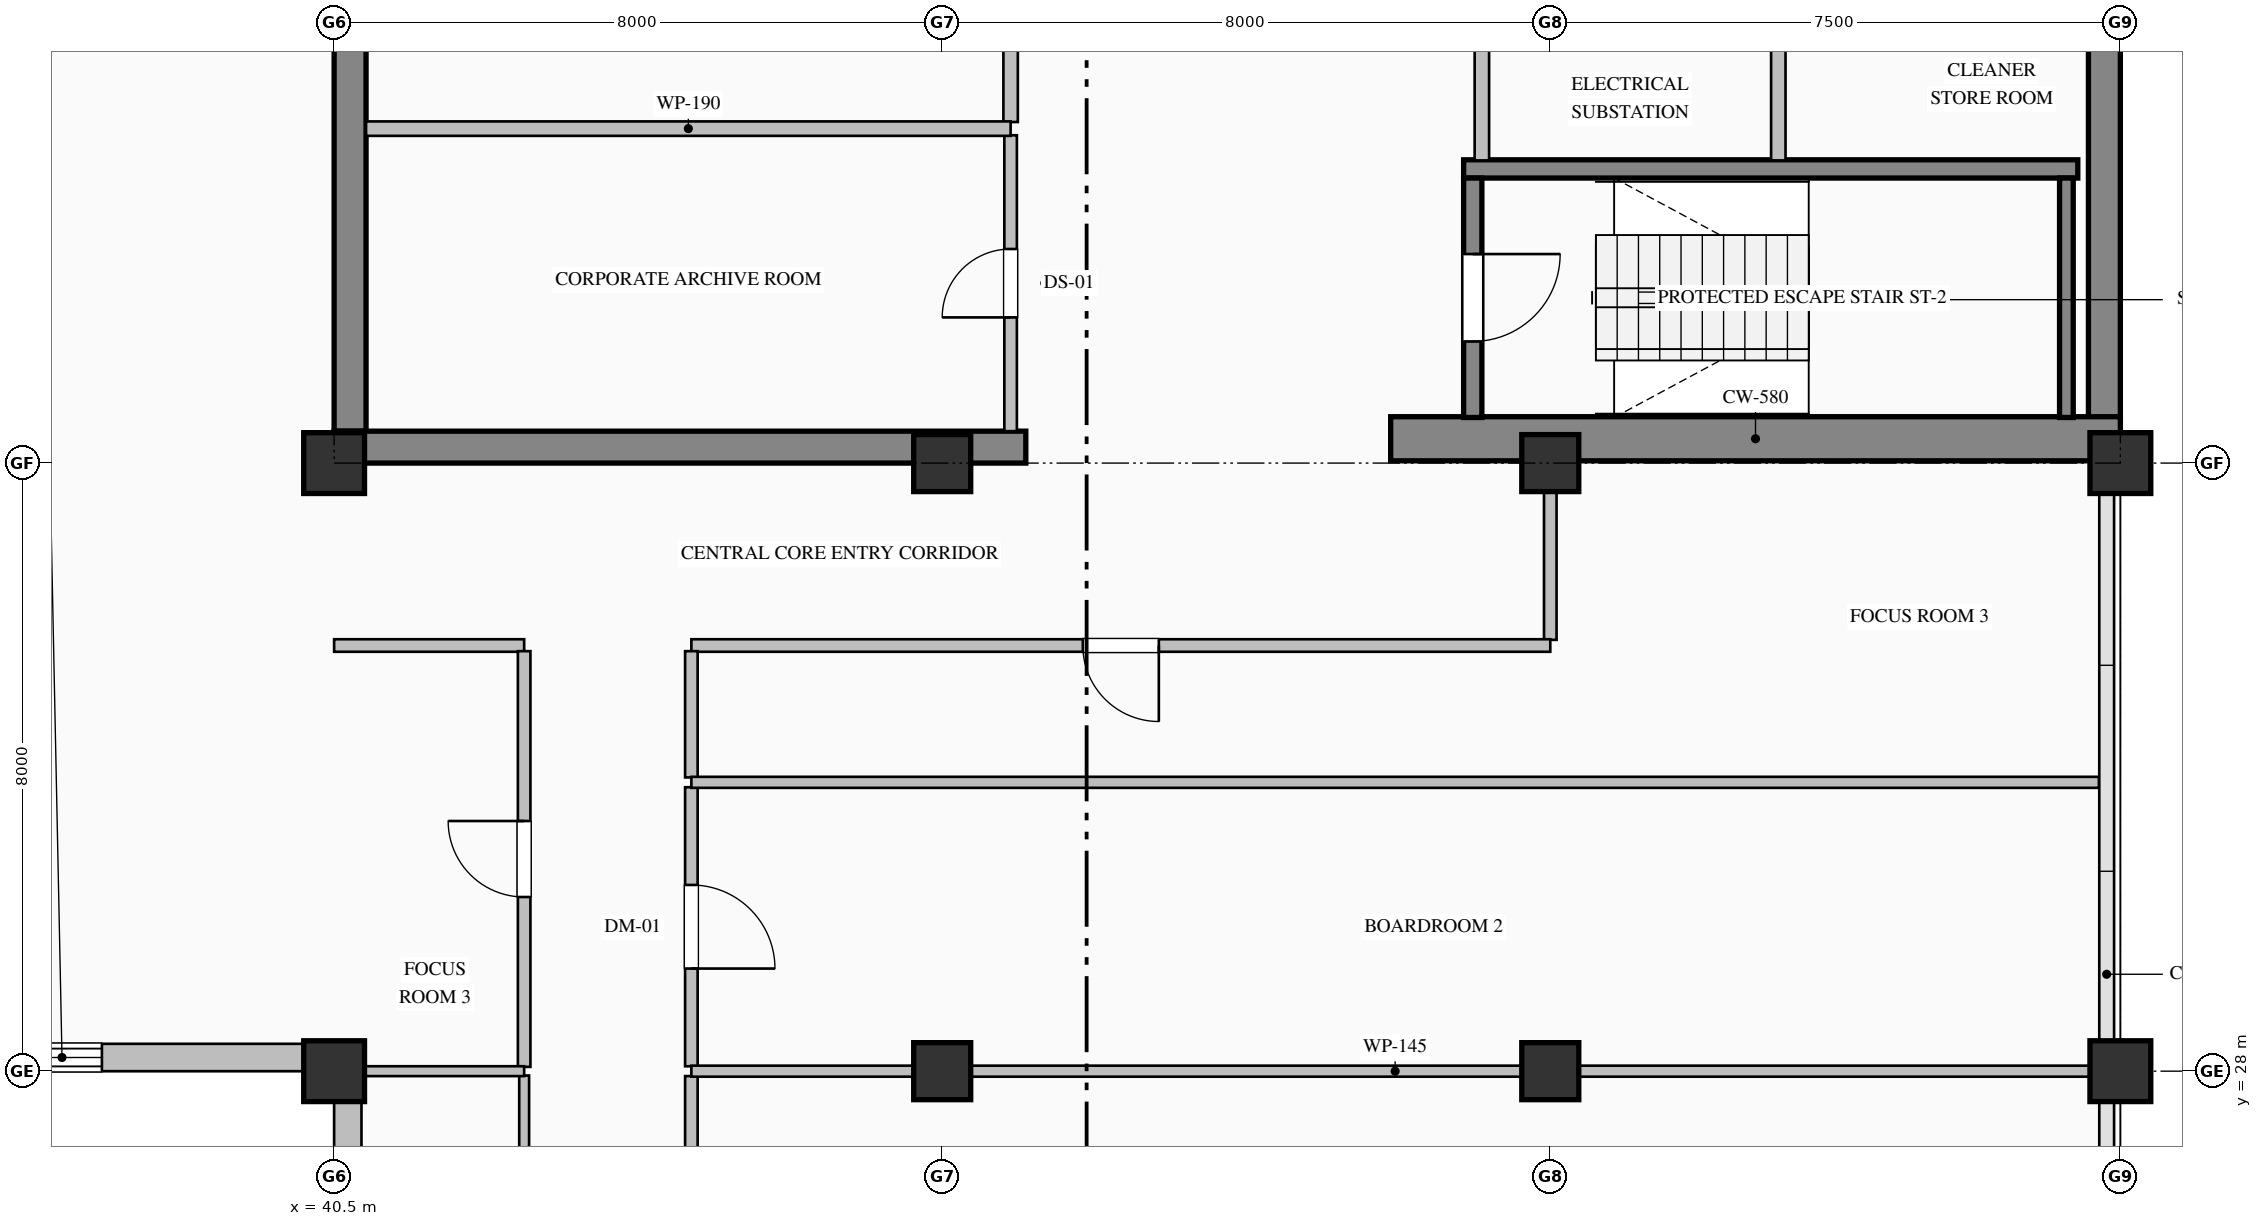
"""IFC4 building model, lengths in metres.
Left out: names, types, materials, properties, quantities, classifications, styles, units other than length and angle.
Written with IfcOpenShell. Run it as: python <this file> out.ifc"""

import sys

from ifc_helpers import new_model, si_unit, direction, frame, frame_2d, origin, origin_2d, place, context, subcontext, project, spatial, rectangle, hollow_rectangle, extrude, element, fill, save


model = new_model("IFC4")
c1 = context("Model", 3, precision=1e-05, world=origin(), true_north=direction((0.0, 1.0)))
c2 = subcontext(c1, "Body", "Model", "MODEL_VIEW")
j1 = project(units=[si_unit("LENGTHUNIT", "METRE"), si_unit("PLANEANGLEUNIT", "RADIAN")], contexts=[c1])
p1 = place(None, origin())
s1 = spatial("IfcSite", under=j1, at=p1, CompositionType="ELEMENT")
p2 = place(p1, origin())
s2 = spatial("IfcBuilding", under=s1, at=p2, CompositionType="ELEMENT")
p3 = place(p2, frame((0.0, 0.0, 299.2)))
s3 = spatial("IfcBuildingStorey", under=s2, at=p3, CompositionType="ELEMENT", Elevation=299.2)
p4 = place(p3, frame((63.79, 36.32, 0.0), z_axis=(0.0, 0.0, 1.0), x_axis=(0.0, 1.0, 0.0)))
e1 = element("IfcWall", 1, at=p4, inside=s3, PredefinedType="SHEAR", context=c2, shape_type="SweptSolid", body=[
    extrude(rectangle(XDim=15.26, YDim=0.42, at=frame_2d((7.63, 0.0))), origin(), (0.0, 0.0, 1.0), 3.785),
])
p5 = place(p3, frame((40.71, 36.42, 0.0), z_axis=(0.0, 0.0, 1.0), x_axis=(0.0, 1.0, 0.0)))
e2 = element("IfcWall", 2, at=p5, inside=s3, PredefinedType="SHEAR", context=c2, shape_type="SweptSolid", body=[
    extrude(rectangle(XDim=7.98, YDim=0.42, at=frame_2d((3.99, 0.0))), origin(), (0.0, 0.0, 1.0), 3.785),
])
p6 = place(p3, frame((40.5, 36.21, 0.0), z_axis=(0.0, 0.0, 1.0), x_axis=(1.0, 0.0, 0.0)))
e3 = element("IfcWall", 3, at=p6, inside=s3, PredefinedType="SHEAR", context=c2, shape_type="SweptSolid", body=[
    extrude(rectangle(XDim=9.1, YDim=0.42, at=frame_2d((4.55, 0.0))), origin(), (0.0, 0.0, 1.0), 3.785),
])
p7 = place(p3, frame((54.4, 36.32, 0.0), z_axis=(0.0, 0.0, 1.0), x_axis=(1.0, 0.0, 0.0)))
e4 = element("IfcWall", 4, at=p7, inside=s3, PredefinedType="SHEAR", context=c2, shape_type="SweptSolid", body=[
    extrude(rectangle(XDim=9.6, YDim=0.58, at=frame_2d((4.8, 0.0))), origin(), (0.0, 0.0, 1.0), 4.0),
])
for number, where, z_axis, x_axis in (
    (5, (40.5, 28.0, 0.0), (0.0, 0.0, 1.0), (1.0, 0.0, 0.0)),
    (6, (40.5, 36.0, 0.0), (0.0, 0.0, 1.0), (1.0, 0.0, 0.0)),
):
    element("IfcColumn", number, at=place(p3, frame(where, z_axis=z_axis, x_axis=x_axis)), inside=s3, PredefinedType="COLUMN", context=c2, shape_type="SweptSolid", body=[
        extrude(hollow_rectangle(XDim=0.8, YDim=0.8, WallThickness=0.032, at=origin_2d()), origin(), (0.0, 0.0, 1.0), 4.0),
    ])
for number, where, z_axis, x_axis in (
    (7, (48.5, 28.0, 0.0), (0.0, 0.0, 1.0), (1.0, 0.0, 0.0)),
    (8, (48.5, 36.0, 0.0), (0.0, 0.0, 1.0), (1.0, 0.0, 0.0)),
    (9, (56.5, 28.0, 0.0), (0.0, 0.0, 1.0), (1.0, 0.0, 0.0)),
    (10, (56.5, 36.0, 0.0), (0.0, 0.0, 1.0), (1.0, 0.0, 0.0)),
):
    element("IfcColumn", number, at=place(p3, frame(where, z_axis=z_axis, x_axis=x_axis)), inside=s3, PredefinedType="COLUMN", context=c2, shape_type="SweptSolid", body=[
        extrude(rectangle(XDim=0.75, YDim=0.75, at=origin_2d()), origin(), (0.0, 0.0, 1.0), 4.0),
    ])
for number, where, z_axis, x_axis in (
    (11, (64.0, 28.0, 0.0), (0.0, 0.0, 1.0), (1.0, 0.0, 0.0)),
    (12, (64.0, 36.0, 0.0), (0.0, 0.0, 1.0), (1.0, 0.0, 0.0)),
):
    element("IfcColumn", number, at=place(p3, frame(where, z_axis=z_axis, x_axis=x_axis)), inside=s3, PredefinedType="COLUMN", context=c2, shape_type="SweptSolid", body=[
        extrude(hollow_rectangle(XDim=0.8, YDim=0.8, WallThickness=0.032, at=origin_2d()), origin(), (0.0, 0.0, 1.0), 4.0),
    ])
p8 = place(p3, frame((40.68, 22.5, 0.0), z_axis=(0.0, 0.0, 1.0), x_axis=(0.0, 1.0, 0.0)))
e13 = element("IfcWall", 13, at=p8, inside=s3, PredefinedType="SOLIDWALL", context=c2, shape_type="SweptSolid", body=[
    extrude(rectangle(XDim=5.86, YDim=0.36, at=frame_2d((2.93, 0.0))), origin(), (0.0, 0.0, 1.0), 3.185),
])
p9 = place(p3, frame((40.52, 28.18, 0.0), z_axis=(0.0, 0.0, 1.0), x_axis=(-1.0, 0.0, 0.0)))
e14 = element("IfcWall", 14, at=p9, inside=s3, PredefinedType="SOLIDWALL", context=c2, shape_type="SweptSolid", body=[
    extrude(rectangle(XDim=20.02, YDim=0.36, at=frame_2d((10.01, 0.0))), origin(), (0.0, 0.0, 1.0), 3.185),
])
p10 = place(p9, frame((3.075, 0.0, 0.8)))
e15 = element("IfcOpeningElement", 15, at=p10, cuts=e14, PredefinedType="OPENING", context=c2, shape_type="SweptSolid", body=[
    extrude(rectangle(XDim=1.05, YDim=2.15, at=frame_2d((0.525, 1.075))), frame((0.0, 0.19, 0.0), z_axis=(0.0, -1.0, 0.0), x_axis=(1.0, 0.0, 0.0)), (0.0, 0.0, 1.0), 0.38),
])
p11 = place(p9, frame((10.325, 0.0, 0.9)))
e16 = element("IfcOpeningElement", 16, at=p11, cuts=e14, PredefinedType="OPENING", context=c2, shape_type="SweptSolid", body=[
    extrude(rectangle(XDim=0.95, YDim=1.85, at=frame_2d((0.475, 0.925))), frame((0.0, 0.19, 0.0), z_axis=(0.0, -1.0, 0.0), x_axis=(1.0, 0.0, 0.0)), (0.0, 0.0, 1.0), 0.38),
])
p12 = place(p9, frame((13.875, 0.0, 0.8)))
e17 = element("IfcOpeningElement", 17, at=p12, cuts=e14, PredefinedType="OPENING", context=c2, shape_type="SweptSolid", body=[
    extrude(rectangle(XDim=1.05, YDim=2.15, at=frame_2d((0.525, 1.075))), frame((0.0, 0.19, 0.0), z_axis=(0.0, -1.0, 0.0), x_axis=(1.0, 0.0, 0.0)), (0.0, 0.0, 1.0), 0.38),
])
p13 = place(p3, frame((55.36, 39.87, 0.0), z_axis=(0.0, 0.0, 1.0), x_axis=(1.0, 0.0, 0.0)))
e18 = element("IfcWall", 18, at=p13, inside=s3, PredefinedType="SOLIDWALL", context=c2, shape_type="SweptSolid", body=[
    extrude(rectangle(XDim=8.08, YDim=0.24, at=frame_2d((4.04, 0.0))), origin(), (0.0, 0.0, 1.0), 4.0),
])
p14 = place(p3, frame((55.48, 39.75, 0.0), z_axis=(0.0, 0.0, 1.0), x_axis=(0.0, -1.0, 0.0)))
e19 = element("IfcWall", 19, at=p14, inside=s3, PredefinedType="SOLIDWALL", context=c2, shape_type="SweptSolid", body=[
    extrude(rectangle(XDim=3.15, YDim=0.24, at=frame_2d((1.575, 0.0))), origin(), (0.0, 0.0, 1.0), 4.0),
])
p15 = place(p14, frame((1.0, 0.0, 0.0)))
e20 = element("IfcOpeningElement", 20, at=p15, cuts=e19, PredefinedType="OPENING", context=c2, shape_type="SweptSolid", body=[
    extrude(rectangle(XDim=1.15, YDim=2.2, at=frame_2d((0.575, 1.1))), frame((0.0, 0.13, 0.0), z_axis=(0.0, -1.0, 0.0), x_axis=(1.0, 0.0, 0.0)), (0.0, 0.0, 1.0), 0.26),
])
p16 = place(p3, frame((63.29, 36.6, 0.0), z_axis=(0.0, 0.0, 1.0), x_axis=(0.0, 1.0, 0.0)))
e21 = element("IfcWall", 21, at=p16, inside=s3, PredefinedType="SOLIDWALL", context=c2, shape_type="SweptSolid", body=[
    extrude(rectangle(XDim=3.15, YDim=0.18, at=frame_2d((1.575, 0.0))), origin(), (0.0, 0.0, 1.0), 4.0),
])
p17 = place(p3, frame((49.4, 36.42, 0.0), z_axis=(0.0, 0.0, 1.0), x_axis=(0.0, 1.0, 0.0)))
e22 = element("IfcWall", 22, at=p17, inside=s3, PredefinedType="PARTITIONING", context=c2, shape_type="SweptSolid", body=[
    extrude(rectangle(XDim=3.893, YDim=0.165, at=frame_2d((1.947, 0.0))), origin(), (0.0, 0.0, 1.0), 3.027),
])
p18 = place(p17, frame((1.497, 0.0, 0.0)))
e23 = element("IfcOpeningElement", 23, at=p18, cuts=e22, PredefinedType="OPENING", context=c2, shape_type="SweptSolid", body=[
    extrude(rectangle(XDim=0.9, YDim=2.15, at=frame_2d((0.45, 1.075))), frame((0.0, 0.093, 0.0), z_axis=(0.0, -1.0, 0.0), x_axis=(1.0, 0.0, 0.0)), (0.0, 0.0, 1.0), 0.185),
])
p19 = place(p3, frame((49.4, 40.487, 0.0), z_axis=(0.0, 0.0, 1.0), x_axis=(0.0, 1.0, 0.0)))
e24 = element("IfcWall", 24, at=p19, inside=s3, PredefinedType="PARTITIONING", context=c2, shape_type="SweptSolid", body=[
    extrude(rectangle(XDim=3.663, YDim=0.19, at=frame_2d((1.832, 0.0))), origin(), (0.0, 0.0, 1.0), 3.027),
])
p20 = place(p19, frame((1.132, 0.0, 0.0)))
e25 = element("IfcOpeningElement", 25, at=p20, cuts=e24, PredefinedType="OPENING", context=c2, shape_type="SweptSolid", body=[
    extrude(rectangle(XDim=1.4, YDim=2.25, at=frame_2d((0.7, 1.125))), frame((0.0, 0.105, 0.0), z_axis=(0.0, -1.0, 0.0), x_axis=(1.0, 0.0, 0.0)), (0.0, 0.0, 1.0), 0.21),
])
p21 = place(p3, frame((55.6, 42.713, 0.0), z_axis=(0.0, 0.0, 1.0), x_axis=(0.0, -1.0, 0.0)))
e26 = element("IfcWall", 26, at=p21, inside=s3, PredefinedType="PARTITIONING", context=c2, shape_type="SweptSolid", body=[
    extrude(rectangle(XDim=2.731, YDim=0.19, at=frame_2d((1.365, 0.0))), origin(), (0.0, 0.0, 1.0), 3.785),
])
p22 = place(p3, frame((40.92, 40.4, 0.0), z_axis=(0.0, 0.0, 1.0), x_axis=(1.0, 0.0, 0.0)))
e27 = element("IfcWall", 27, at=p22, inside=s3, PredefinedType="PARTITIONING", context=c2, shape_type="SweptSolid", body=[
    extrude(rectangle(XDim=8.48, YDim=0.19, at=frame_2d((4.24, 0.0))), origin(), (0.0, 0.0, 1.0), 3.785),
])
p23 = place(p3, frame((59.5, 42.713, 0.0), z_axis=(0.0, 0.0, 1.0), x_axis=(0.0, -1.0, 0.0)))
e28 = element("IfcWall", 28, at=p23, inside=s3, PredefinedType="PARTITIONING", context=c2, shape_type="SweptSolid", body=[
    extrude(rectangle(XDim=2.731, YDim=0.19, at=frame_2d((1.365, 0.0))), origin(), (0.0, 0.0, 1.0), 3.785),
])
p24 = place(p3, frame((56.5, 36.0, 0.0), z_axis=(0.0, 0.0, 1.0), x_axis=(0.0, -1.0, 0.0)))
e29 = element("IfcWall", 29, at=p24, inside=s3, PredefinedType="PARTITIONING", context=c2, shape_type="SweptSolid", body=[
    extrude(rectangle(XDim=2.325, YDim=0.165, at=frame_2d((1.163, 0.0))), origin(), (0.0, 0.0, 1.0), 3.177),
])
p25 = place(p3, frame((56.5, 33.6, 0.0), z_axis=(0.0, 0.0, 1.0), x_axis=(-1.0, 0.0, 0.0)))
e30 = element("IfcWall", 30, at=p25, inside=s3, PredefinedType="PARTITIONING", context=c2, shape_type="SweptSolid", body=[
    extrude(rectangle(XDim=11.3, YDim=0.165, at=frame_2d((5.65, 0.0))), origin(), (0.0, 0.0, 1.0), 3.785),
])
p26 = place(p25, frame((5.15, 0.0, 0.0)))
e31 = element("IfcOpeningElement", 31, at=p26, cuts=e30, PredefinedType="OPENING", context=c2, shape_type="SweptSolid", body=[
    extrude(rectangle(XDim=1.0, YDim=2.15, at=frame_2d((0.5, 1.075))), frame((0.0, 0.093, 0.0), z_axis=(0.0, -1.0, 0.0), x_axis=(1.0, 0.0, 0.0)), (0.0, 0.0, 1.0), 0.185),
])
p27 = place(p3, frame((43.0, 33.6, 0.0), z_axis=(0.0, 0.0, 1.0), x_axis=(-1.0, 0.0, 0.0)))
e32 = element("IfcWall", 32, at=p27, inside=s3, PredefinedType="PARTITIONING", context=c2, shape_type="SweptSolid", body=[
    extrude(rectangle(XDim=2.5, YDim=0.165, at=frame_2d((1.25, 0.0))), origin(), (0.0, 0.0, 1.0), 3.785),
])
p28 = place(p3, frame((45.2, 27.936, 0.0), z_axis=(0.0, 0.0, 1.0), x_axis=(0.0, -1.0, 0.0)))
e33 = element("IfcWall", 33, at=p28, inside=s3, PredefinedType="PARTITIONING", context=c2, shape_type="SweptSolid", body=[
    extrude(rectangle(XDim=2.861, YDim=0.165, at=frame_2d((1.431, 0.0))), origin(), (0.0, 0.0, 1.0), 3.785),
])
p29 = place(p3, frame((45.2, 31.736, 0.0), z_axis=(0.0, 0.0, 1.0), x_axis=(0.0, -1.0, 0.0)))
e34 = element("IfcWall", 34, at=p29, inside=s3, PredefinedType="PARTITIONING", context=c2, shape_type="SweptSolid", body=[
    extrude(rectangle(XDim=3.671, YDim=0.165, at=frame_2d((1.835, 0.0))), origin(), (0.0, 0.0, 1.0), 3.785),
])
p30 = place(p29, frame((1.285, 0.0, 0.0)))
e35 = element("IfcOpeningElement", 35, at=p30, cuts=e34, PredefinedType="OPENING", context=c2, shape_type="SweptSolid", body=[
    extrude(rectangle(XDim=1.1, YDim=2.2, at=frame_2d((0.55, 1.1))), frame((0.0, 0.093, 0.0), z_axis=(0.0, -1.0, 0.0), x_axis=(1.0, 0.0, 0.0)), (0.0, 0.0, 1.0), 0.185),
])
p31 = place(p3, frame((45.2, 33.525, 0.0), z_axis=(0.0, 0.0, 1.0), x_axis=(0.0, -1.0, 0.0)))
e36 = element("IfcWall", 36, at=p31, inside=s3, PredefinedType="PARTITIONING", context=c2, shape_type="SweptSolid", body=[
    extrude(rectangle(XDim=1.661, YDim=0.165, at=frame_2d((0.831, 0.0))), origin(), (0.0, 0.0, 1.0), 3.785),
])
p32 = place(p3, frame((43.0, 24.557, 0.0), z_axis=(0.0, 0.0, 1.0), x_axis=(0.0, 1.0, 0.0)))
e37 = element("IfcWall", 37, at=p32, inside=s3, PredefinedType="PARTITIONING", context=c2, shape_type="SweptSolid", body=[
    extrude(rectangle(XDim=3.386, YDim=0.13, at=frame_2d((1.693, 0.0))), origin(), (0.0, 0.0, 1.0), 3.785),
])
p33 = place(p32, frame((1.193, 0.0, 0.0)))
e38 = element("IfcOpeningElement", 38, at=p33, cuts=e37, PredefinedType="OPENING", context=c2, shape_type="SweptSolid", body=[
    extrude(rectangle(XDim=1.0, YDim=2.15, at=frame_2d((0.5, 1.075))), frame((0.0, 0.075, 0.0), z_axis=(0.0, -1.0, 0.0), x_axis=(1.0, 0.0, 0.0)), (0.0, 0.0, 1.0), 0.15),
])
p34 = place(p3, frame((43.0, 28.057, 0.0), z_axis=(0.0, 0.0, 1.0), x_axis=(0.0, 1.0, 0.0)))
e39 = element("IfcWall", 39, at=p34, inside=s3, PredefinedType="PARTITIONING", context=c2, shape_type="SweptSolid", body=[
    extrude(rectangle(XDim=5.469, YDim=0.165, at=frame_2d((2.734, 0.0))), origin(), (0.0, 0.0, 1.0), 3.785),
])
p35 = place(p34, frame((2.234, 0.0, 0.0)))
e40 = element("IfcOpeningElement", 40, at=p35, cuts=e39, PredefinedType="OPENING", context=c2, shape_type="SweptSolid", body=[
    extrude(rectangle(XDim=1.0, YDim=2.15, at=frame_2d((0.5, 1.075))), frame((0.0, 0.093, 0.0), z_axis=(0.0, -1.0, 0.0), x_axis=(1.0, 0.0, 0.0)), (0.0, 0.0, 1.0), 0.185),
])
p36 = place(p3, frame((45.2, 28.0, 0.0), z_axis=(0.0, 0.0, 1.0), x_axis=(1.0, 0.0, 0.0)))
e41 = element("IfcWall", 41, at=p36, inside=s3, PredefinedType="PARTITIONING", context=c2, shape_type="SweptSolid", body=[
    extrude(rectangle(XDim=18.518, YDim=0.145, at=frame_2d((9.259, 0.0))), origin(), (0.0, 0.0, 1.0), 3.177),
])
p37 = place(p3, frame((45.2, 31.8, 0.0), z_axis=(0.0, 0.0, 1.0), x_axis=(1.0, 0.0, 0.0)))
e42 = element("IfcWall", 42, at=p37, inside=s3, PredefinedType="PARTITIONING", context=c2, shape_type="SweptSolid", body=[
    extrude(rectangle(XDim=18.518, YDim=0.145, at=frame_2d((9.259, 0.0))), origin(), (0.0, 0.0, 1.0), 3.785),
])
p38 = place(p3, frame((40.852, 28.0, 0.0), z_axis=(0.0, 0.0, 1.0), x_axis=(1.0, 0.0, 0.0)))
e43 = element("IfcWall", 43, at=p38, inside=s3, PredefinedType="PARTITIONING", context=c2, shape_type="SweptSolid", body=[
    extrude(rectangle(XDim=2.148, YDim=0.13, at=frame_2d((1.074, 0.0))), origin(), (0.0, 0.0, 1.0), 3.177),
])
p39 = place(p10, origin())
e44 = element("IfcWindow", 44, at=p39, inside=s3, PartitioningType="SINGLE_PANEL", PredefinedType="WINDOW", context=c2, shape_type="SweptSolid", body=[
    extrude(rectangle(XDim=1.05, YDim=2.15, at=frame_2d((0.525, 1.075))), frame((0.0, 0.15, 0.0), z_axis=(0.0, -1.0, 0.0), x_axis=(1.0, 0.0, 0.0)), (0.0, 0.0, 1.0), 0.06),
])
fill(e15, e44)
p40 = place(p15, origin())
e45 = element("IfcDoor", 45, at=p40, inside=s3, OperationType="SINGLE_SWING_LEFT", PredefinedType="DOOR", context=c2, shape_type="SweptSolid", body=[
    extrude(rectangle(XDim=1.15, YDim=2.2, at=frame_2d((0.575, 1.1))), frame((0.0, 0.025, 0.0), z_axis=(0.0, -1.0, 0.0), x_axis=(1.0, 0.0, 0.0)), (0.0, 0.0, 1.0), 0.05),
])
fill(e20, e45)
p41 = place(p18, origin())
e46 = element("IfcDoor", 46, at=p41, inside=s3, OperationType="SINGLE_SWING_LEFT", PredefinedType="DOOR", context=c2, shape_type="SweptSolid", body=[
    extrude(rectangle(XDim=0.9, YDim=2.15, at=frame_2d((0.45, 1.075))), frame((0.0, 0.025, 0.0), z_axis=(0.0, -1.0, 0.0), x_axis=(1.0, 0.0, 0.0)), (0.0, 0.0, 1.0), 0.05),
])
fill(e23, e46)
p42 = place(p30, origin())
e47 = element("IfcDoor", 47, at=p42, inside=s3, OperationType="SINGLE_SWING_RIGHT", PredefinedType="DOOR", context=c2, shape_type="SweptSolid", body=[
    extrude(rectangle(XDim=1.1, YDim=2.2, at=frame_2d((0.55, 1.1))), frame((0.0, 0.025, 0.0), z_axis=(0.0, -1.0, 0.0), x_axis=(1.0, 0.0, 0.0)), (0.0, 0.0, 1.0), 0.05),
])
fill(e35, e47)
p43 = place(p26, origin())
e48 = element("IfcDoor", 48, at=p43, inside=s3, OperationType="SINGLE_SWING_LEFT", PredefinedType="DOOR", context=c2, shape_type="SweptSolid", body=[
    extrude(rectangle(XDim=1.0, YDim=2.15, at=frame_2d((0.5, 1.075))), frame((0.0, 0.025, 0.0), z_axis=(0.0, -1.0, 0.0), x_axis=(1.0, 0.0, 0.0)), (0.0, 0.0, 1.0), 0.05),
])
fill(e31, e48)
p44 = place(p35, origin())
e49 = element("IfcDoor", 49, at=p44, inside=s3, OperationType="SINGLE_SWING_RIGHT", PredefinedType="DOOR", context=c2, shape_type="SweptSolid", body=[
    extrude(rectangle(XDim=1.0, YDim=2.15, at=frame_2d((0.5, 1.075))), frame((0.0, 0.025, 0.0), z_axis=(0.0, -1.0, 0.0), x_axis=(1.0, 0.0, 0.0)), (0.0, 0.0, 1.0), 0.05),
])
fill(e40, e49)
save(model, sys.argv[1])
